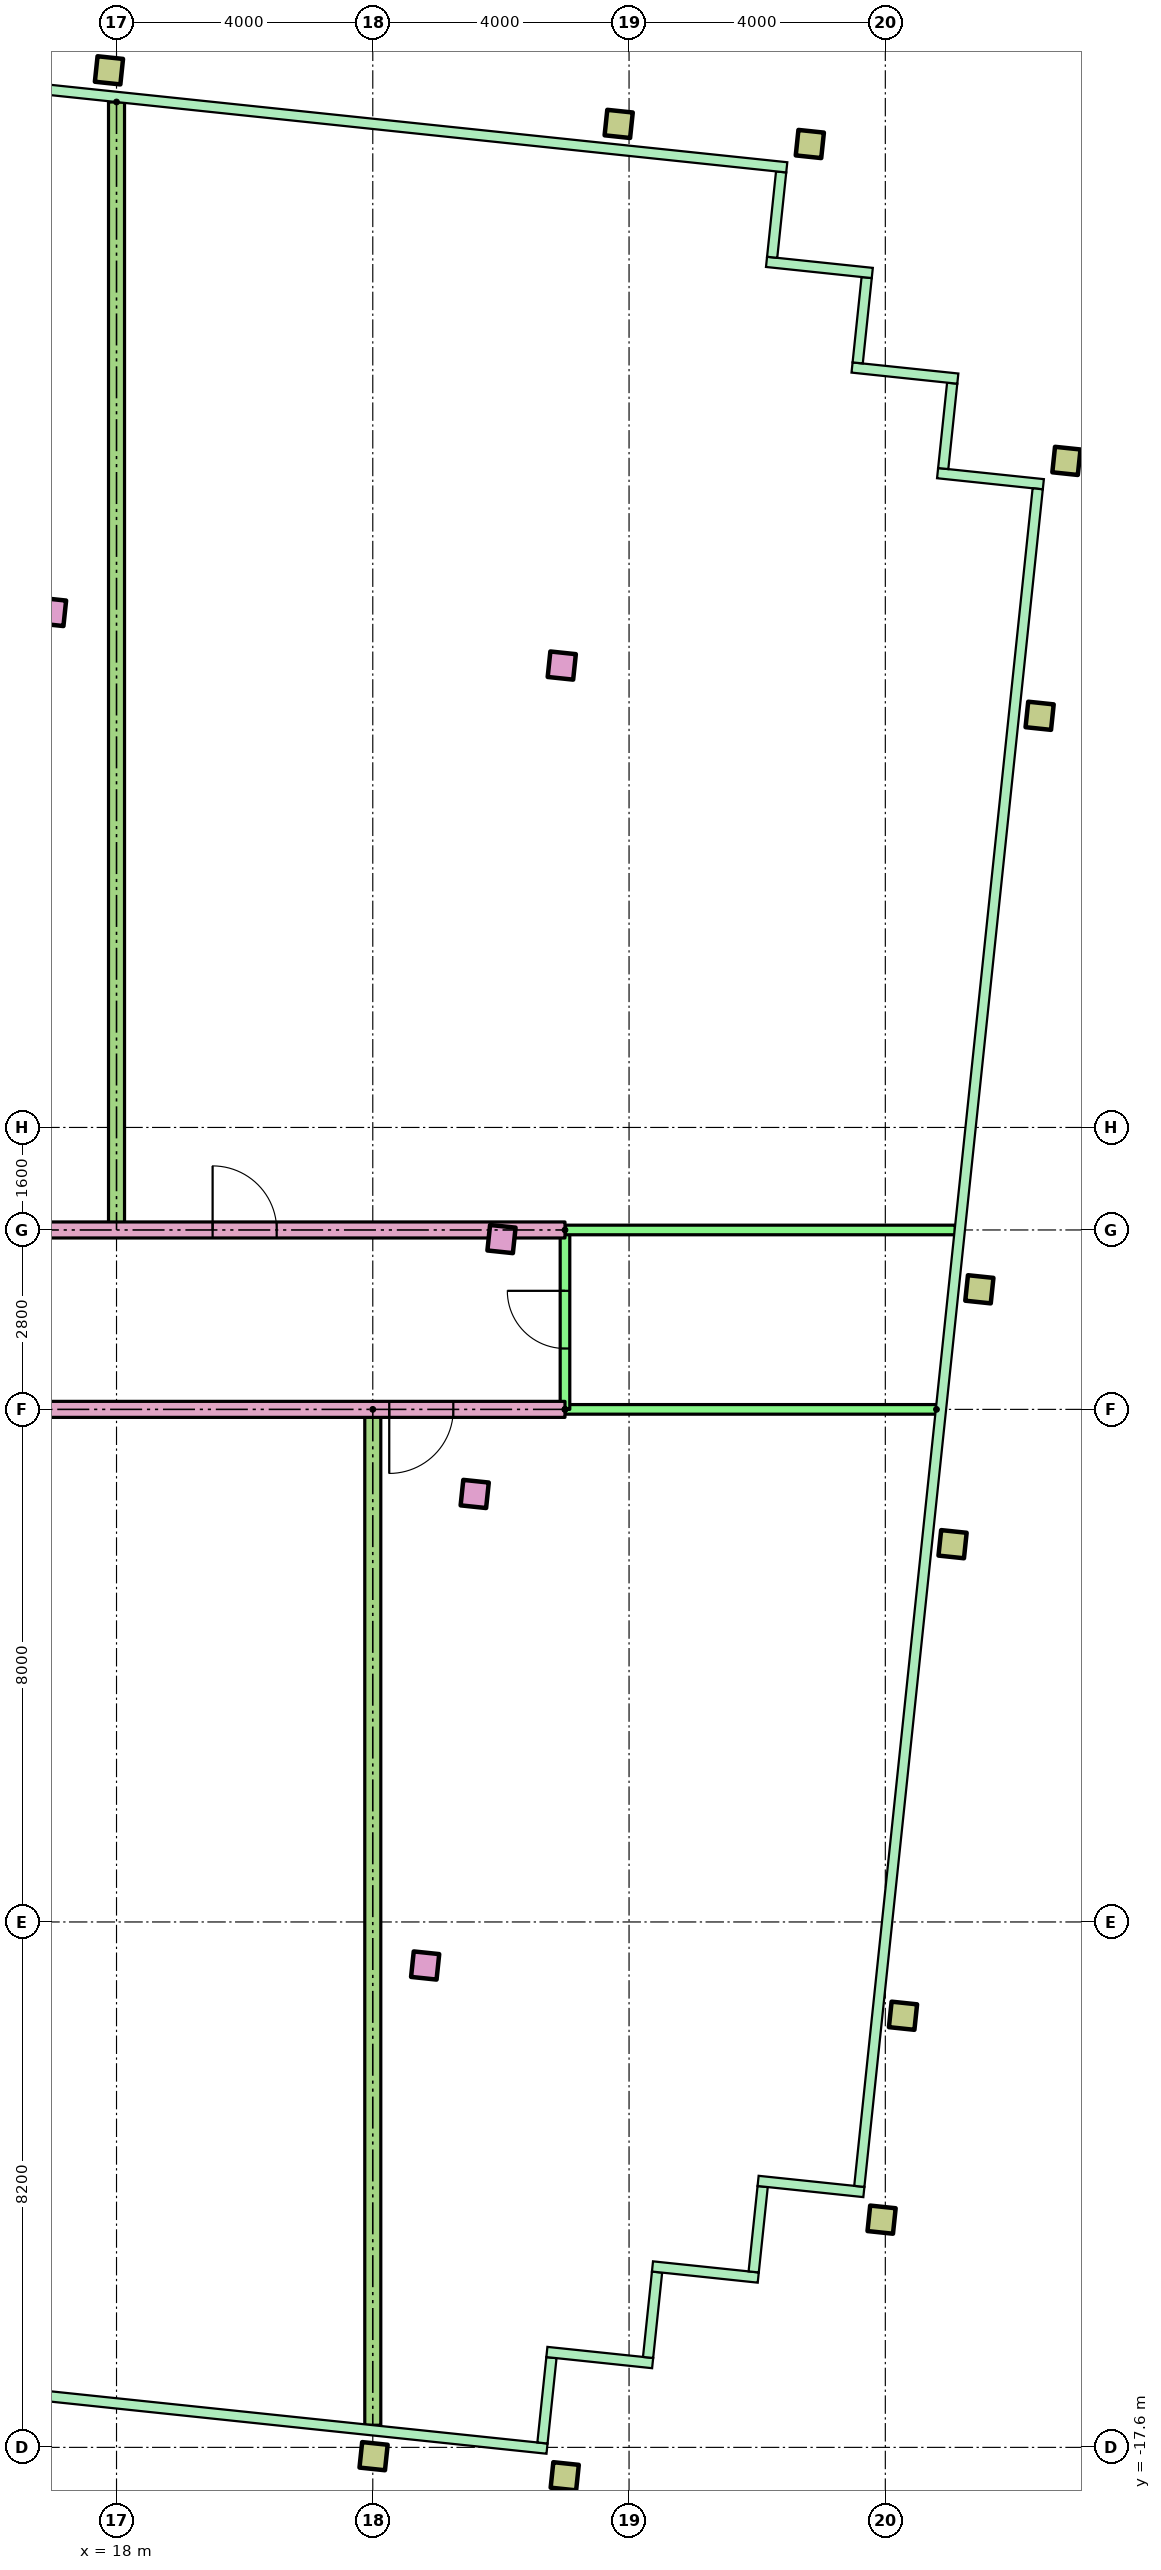
"""IFC4 building model, lengths in metres.
Left out: names, types, materials, properties, quantities, classifications, styles, units other than length and angle.
Written with IfcOpenShell. Run it as: python <this file> out.ifc"""

import sys

from ifc_helpers import new_model, si_unit, direction, frame, frame_2d, origin, origin_2d, place, context, subcontext, project, spatial, rectangle, hollow_rectangle, extrude, element, fill, save


model = new_model("IFC4")
c1 = context("Model", 3, precision=1e-05, world=origin(), true_north=direction((0.0, 1.0)))
c2 = subcontext(c1, "Body", "Model", "MODEL_VIEW")
j1 = project(units=[si_unit("LENGTHUNIT", "METRE"), si_unit("PLANEANGLEUNIT", "RADIAN")], contexts=[c1])
p1 = place(None, origin())
s1 = spatial("IfcSite", under=j1, at=p1, CompositionType="ELEMENT")
p2 = place(p1, origin())
s2 = spatial("IfcBuilding", under=s1, at=p2, CompositionType="ELEMENT")
p3 = place(p2, frame((0.0, 0.0, 294.9)))
s3 = spatial("IfcBuildingStorey", under=s2, at=p3, CompositionType="ELEMENT", Elevation=294.9)
for number, where, z_axis, x_axis in (
    (1, (22.012, -17.737, 0.0), (0.0, 0.0, 1.0), (0.995, -0.105, 0.0)),
    (2, (24.996, -18.051, 0.0), (0.0, 0.0, 1.0), (0.995, -0.105, 0.0)),
    (3, (29.942, -14.046, 0.0), (0.0, 0.0, 1.0), (0.995, -0.105, 0.0)),
):
    element("IfcColumn", number, at=place(p3, frame(where, z_axis=z_axis, x_axis=x_axis)), inside=s3, PredefinedType="COLUMN", context=c2, shape_type="SweptSolid", body=[
        extrude(hollow_rectangle(XDim=0.4, YDim=0.4, WallThickness=0.02, at=origin_2d()), origin(), (0.0, 0.0, 1.0), 3.4),
    ])
p4 = place(p3, frame((22.817, -10.08, 0.0), z_axis=(0.0, 0.0, 1.0), x_axis=(0.994521895368, -0.104528463268, 0.0)))
e4 = element("IfcColumn", 4, at=p4, inside=s3, PredefinedType="COLUMN", context=c2, shape_type="SweptSolid", body=[
    extrude(rectangle(XDim=0.4, YDim=0.4, at=origin_2d()), origin(), (0.0, 0.0, 1.0), 3.4),
])
p5 = place(p3, frame((30.276, -10.864, 0.0), z_axis=(0.0, 0.0, 1.0), x_axis=(0.994521895368, -0.104528463268, 0.0)))
e5 = element("IfcColumn", 5, at=p5, inside=s3, PredefinedType="COLUMN", context=c2, shape_type="SweptSolid", body=[
    extrude(hollow_rectangle(XDim=0.4, YDim=0.4, WallThickness=0.02, at=origin_2d()), origin(), (0.0, 0.0, 1.0), 3.4),
])
p6 = place(p3, frame((23.591, -2.72, 0.0), z_axis=(0.0, 0.0, 1.0), x_axis=(0.994521895368, -0.104528463268, 0.0)))
e6 = element("IfcColumn", 6, at=p6, inside=s3, PredefinedType="COLUMN", context=c2, shape_type="SweptSolid", body=[
    extrude(rectangle(XDim=0.4, YDim=0.4, at=origin_2d()), origin(), (0.0, 0.0, 1.0), 3.4),
])
p7 = place(p3, frame((31.05, -3.504, 0.0), z_axis=(0.0, 0.0, 1.0), x_axis=(0.994521895368, -0.104528463268, 0.0)))
e7 = element("IfcColumn", 7, at=p7, inside=s3, PredefinedType="COLUMN", context=c2, shape_type="SweptSolid", body=[
    extrude(hollow_rectangle(XDim=0.4, YDim=0.4, WallThickness=0.02, at=origin_2d()), origin(), (0.0, 0.0, 1.0), 3.4),
])
p8 = place(p3, frame((24.009, 1.258, 0.0), z_axis=(0.0, 0.0, 1.0), x_axis=(0.994521895368, -0.104528463268, 0.0)))
e8 = element("IfcColumn", 8, at=p8, inside=s3, PredefinedType="COLUMN", context=c2, shape_type="SweptSolid", body=[
    extrude(rectangle(XDim=0.4, YDim=0.4, at=origin_2d()), origin(), (0.0, 0.0, 1.0), 3.4),
])
p9 = place(p3, frame((31.468, 0.474, 0.0), z_axis=(0.0, 0.0, 1.0), x_axis=(0.994521895368, -0.104528463268, 0.0)))
e9 = element("IfcColumn", 9, at=p9, inside=s3, PredefinedType="COLUMN", context=c2, shape_type="SweptSolid", body=[
    extrude(hollow_rectangle(XDim=0.4, YDim=0.4, WallThickness=0.02, at=origin_2d()), origin(), (0.0, 0.0, 1.0), 3.4),
])
for number, where, z_axis, x_axis in (
    (10, (16.993, 11.045, 0.0), (0.0, 0.0, 1.0), (0.995, -0.105, 0.0)),
    (11, (24.95, 10.209, 0.0), (0.0, 0.0, 1.0), (0.995, -0.105, 0.0)),
):
    element("IfcColumn", number, at=place(p3, frame(where, z_axis=z_axis, x_axis=x_axis)), inside=s3, PredefinedType="COLUMN", context=c2, shape_type="SweptSolid", body=[
        extrude(rectangle(XDim=0.4, YDim=0.4, at=origin_2d()), origin(), (0.0, 0.0, 1.0), 3.4),
    ])
for number, where, z_axis, x_axis in (
    (12, (32.409, 9.425, 0.0), (0.0, 0.0, 1.0), (0.995, -0.105, 0.0)),
    (13, (32.827, 13.403, 0.0), (0.0, 0.0, 1.0), (0.995, -0.105, 0.0)),
    (14, (17.882, 19.498, 0.0), (0.0, 0.0, 1.0), (0.995, -0.105, 0.0)),
    (15, (25.838, 18.662, 0.0), (0.0, 0.0, 1.0), (0.995, -0.105, 0.0)),
    (16, (28.822, 18.349, 0.0), (0.0, 0.0, 1.0), (0.995, -0.105, 0.0)),
):
    element("IfcColumn", number, at=place(p3, frame(where, z_axis=z_axis, x_axis=x_axis)), inside=s3, PredefinedType="COLUMN", context=c2, shape_type="SweptSolid", body=[
        extrude(hollow_rectangle(XDim=0.4, YDim=0.4, WallThickness=0.02, at=origin_2d()), origin(), (0.0, 0.0, 1.0), 3.4),
    ])
p10 = place(p3, frame((25.0, -1.4, 0.0), z_axis=(0.0, 0.0, 1.0), x_axis=(-1.0, 0.0, 0.0)))
e17 = element("IfcWall", 17, at=p10, inside=s3, PredefinedType="PARTITIONING", context=c2, shape_type="SweptSolid", body=[
    extrude(rectangle(XDim=15.0, YDim=0.25, at=frame_2d((7.5, 0.0))), origin(), (0.0, 0.0, 1.0), 2.6),
])
p11 = place(p10, frame((12.5, 0.0, 0.0)))
e18 = element("IfcOpeningElement", 18, at=p11, cuts=e17, PredefinedType="OPENING", context=c2, shape_type="SweptSolid", body=[
    extrude(rectangle(XDim=1.0, YDim=2.1, at=frame_2d((0.5, 1.05))), frame((0.0, 0.135, 0.0), z_axis=(0.0, -1.0, 0.0), x_axis=(1.0, 0.0, 0.0)), (0.0, 0.0, 1.0), 0.27),
])
p12 = place(p10, frame((1.743, 0.0, 0.0)))
e19 = element("IfcOpeningElement", 19, at=p12, cuts=e17, PredefinedType="OPENING", context=c2, shape_type="SweptSolid", body=[
    extrude(rectangle(XDim=1.0, YDim=2.1, at=frame_2d((0.5, 1.05))), frame((0.0, 0.135, 0.0), z_axis=(0.0, -1.0, 0.0), x_axis=(1.0, 0.0, 0.0)), (0.0, 0.0, 1.0), 0.27),
])
p13 = place(p3, frame((30.798, -1.4, 0.0), z_axis=(0.0, 0.0, 1.0), x_axis=(-1.0, 0.0, 0.0)))
e20 = element("IfcWall", 20, at=p13, inside=s3, PredefinedType="PARTITIONING", context=c2, shape_type="SweptSolid", body=[
    extrude(rectangle(XDim=5.798, YDim=0.15, at=frame_2d((2.899, 0.0))), origin(), (0.0, 0.0, 1.0), 2.6),
])
p14 = place(p3, frame((25.0, -1.4, 0.0), z_axis=(0.0, 0.0, 1.0), x_axis=(0.0, 1.0, 0.0)))
e21 = element("IfcWall", 21, at=p14, inside=s3, PredefinedType="PARTITIONING", context=c2, shape_type="SweptSolid", body=[
    extrude(rectangle(XDim=2.8, YDim=0.15, at=frame_2d((1.4, 0.0))), origin(), (0.0, 0.0, 1.0), 2.6),
])
p15 = place(p14, frame((0.95, 0.0, 0.0)))
e22 = element("IfcOpeningElement", 22, at=p15, cuts=e21, PredefinedType="OPENING", context=c2, shape_type="SweptSolid", body=[
    extrude(rectangle(XDim=0.9, YDim=2.1, at=frame_2d((0.45, 1.05))), frame((0.0, 0.085, 0.0), z_axis=(0.0, -1.0, 0.0), x_axis=(1.0, 0.0, 0.0)), (0.0, 0.0, 1.0), 0.17),
])
p16 = place(p3, frame((22.0, -1.4, 0.0), z_axis=(0.0, 0.0, 1.0), x_axis=(0.0, -1.0, 0.0)))
e23 = element("IfcWall", 23, at=p16, inside=s3, PredefinedType="PARTITIONING", context=c2, shape_type="SweptSolid", body=[
    extrude(rectangle(XDim=15.854, YDim=0.25, at=frame_2d((7.927, 0.0))), origin(), (0.0, 0.0, 1.0), 2.6),
])
p17 = place(p3, frame((10.0, 1.4, 0.0)))
e24 = element("IfcWall", 24, at=p17, inside=s3, PredefinedType="PARTITIONING", context=c2, shape_type="SweptSolid", body=[
    extrude(rectangle(XDim=15.0, YDim=0.25, at=frame_2d((7.5, 0.0))), origin(), (0.0, 0.0, 1.0), 2.6),
])
p18 = place(p17, frame((1.5, 0.0, 0.0)))
e25 = element("IfcOpeningElement", 25, at=p18, cuts=e24, PredefinedType="OPENING", context=c2, shape_type="SweptSolid", body=[
    extrude(rectangle(XDim=1.0, YDim=2.1, at=frame_2d((0.5, 1.05))), frame((0.0, 0.135, 0.0), z_axis=(0.0, -1.0, 0.0), x_axis=(1.0, 0.0, 0.0)), (0.0, 0.0, 1.0), 0.27),
])
p19 = place(p17, frame((9.5, 0.0, 0.0)))
e26 = element("IfcOpeningElement", 26, at=p19, cuts=e24, PredefinedType="OPENING", context=c2, shape_type="SweptSolid", body=[
    extrude(rectangle(XDim=1.0, YDim=2.1, at=frame_2d((0.5, 1.05))), frame((0.0, 0.135, 0.0), z_axis=(0.0, -1.0, 0.0), x_axis=(1.0, 0.0, 0.0)), (0.0, 0.0, 1.0), 0.27),
])
p20 = place(p3, frame((25.0, 1.4, 0.0)))
e27 = element("IfcWall", 27, at=p20, inside=s3, PredefinedType="PARTITIONING", context=c2, shape_type="SweptSolid", body=[
    extrude(rectangle(XDim=6.093, YDim=0.15, at=frame_2d((3.046, 0.0))), origin(), (0.0, 0.0, 1.0), 2.6),
])
p21 = place(p3, frame((18.0, 19.004, 0.0), z_axis=(0.0, 0.0, 1.0), x_axis=(0.0, -1.0, 0.0)))
e28 = element("IfcWall", 28, at=p21, inside=s3, PredefinedType="PARTITIONING", context=c2, shape_type="SweptSolid", body=[
    extrude(rectangle(XDim=17.604, YDim=0.25, at=frame_2d((8.802, 0.0))), origin(), (0.0, 0.0, 1.0), 2.6),
])
p22 = place(p12, origin())
e29 = element("IfcDoor", 29, at=p22, inside=s3, OperationType="SINGLE_SWING_RIGHT", PredefinedType="DOOR", context=c2, shape_type="SweptSolid", body=[
    extrude(rectangle(XDim=1.0, YDim=2.1, at=frame_2d((0.5, 1.05))), frame((0.0, 0.025, 0.0), z_axis=(0.0, -1.0, 0.0), x_axis=(1.0, 0.0, 0.0)), (0.0, 0.0, 1.0), 0.05),
])
fill(e19, e29)
p23 = place(p15, origin())
e30 = element("IfcDoor", 30, at=p23, inside=s3, OperationType="SINGLE_SWING_RIGHT", PredefinedType="DOOR", context=c2, shape_type="SweptSolid", body=[
    extrude(rectangle(XDim=0.9, YDim=2.1, at=frame_2d((0.45, 1.05))), frame((0.0, 0.025, 0.0), z_axis=(0.0, -1.0, 0.0), x_axis=(1.0, 0.0, 0.0)), (0.0, 0.0, 1.0), 0.05),
])
fill(e22, e30)
p24 = place(p19, origin())
e31 = element("IfcDoor", 31, at=p24, inside=s3, OperationType="SINGLE_SWING_LEFT", PredefinedType="DOOR", context=c2, shape_type="SweptSolid", body=[
    extrude(rectangle(XDim=1.0, YDim=2.1, at=frame_2d((0.5, 1.05))), frame((0.0, 0.025, 0.0), z_axis=(0.0, -1.0, 0.0), x_axis=(1.0, 0.0, 0.0)), (0.0, 0.0, 1.0), 0.05),
])
fill(e26, e31)
save(model, sys.argv[1])
